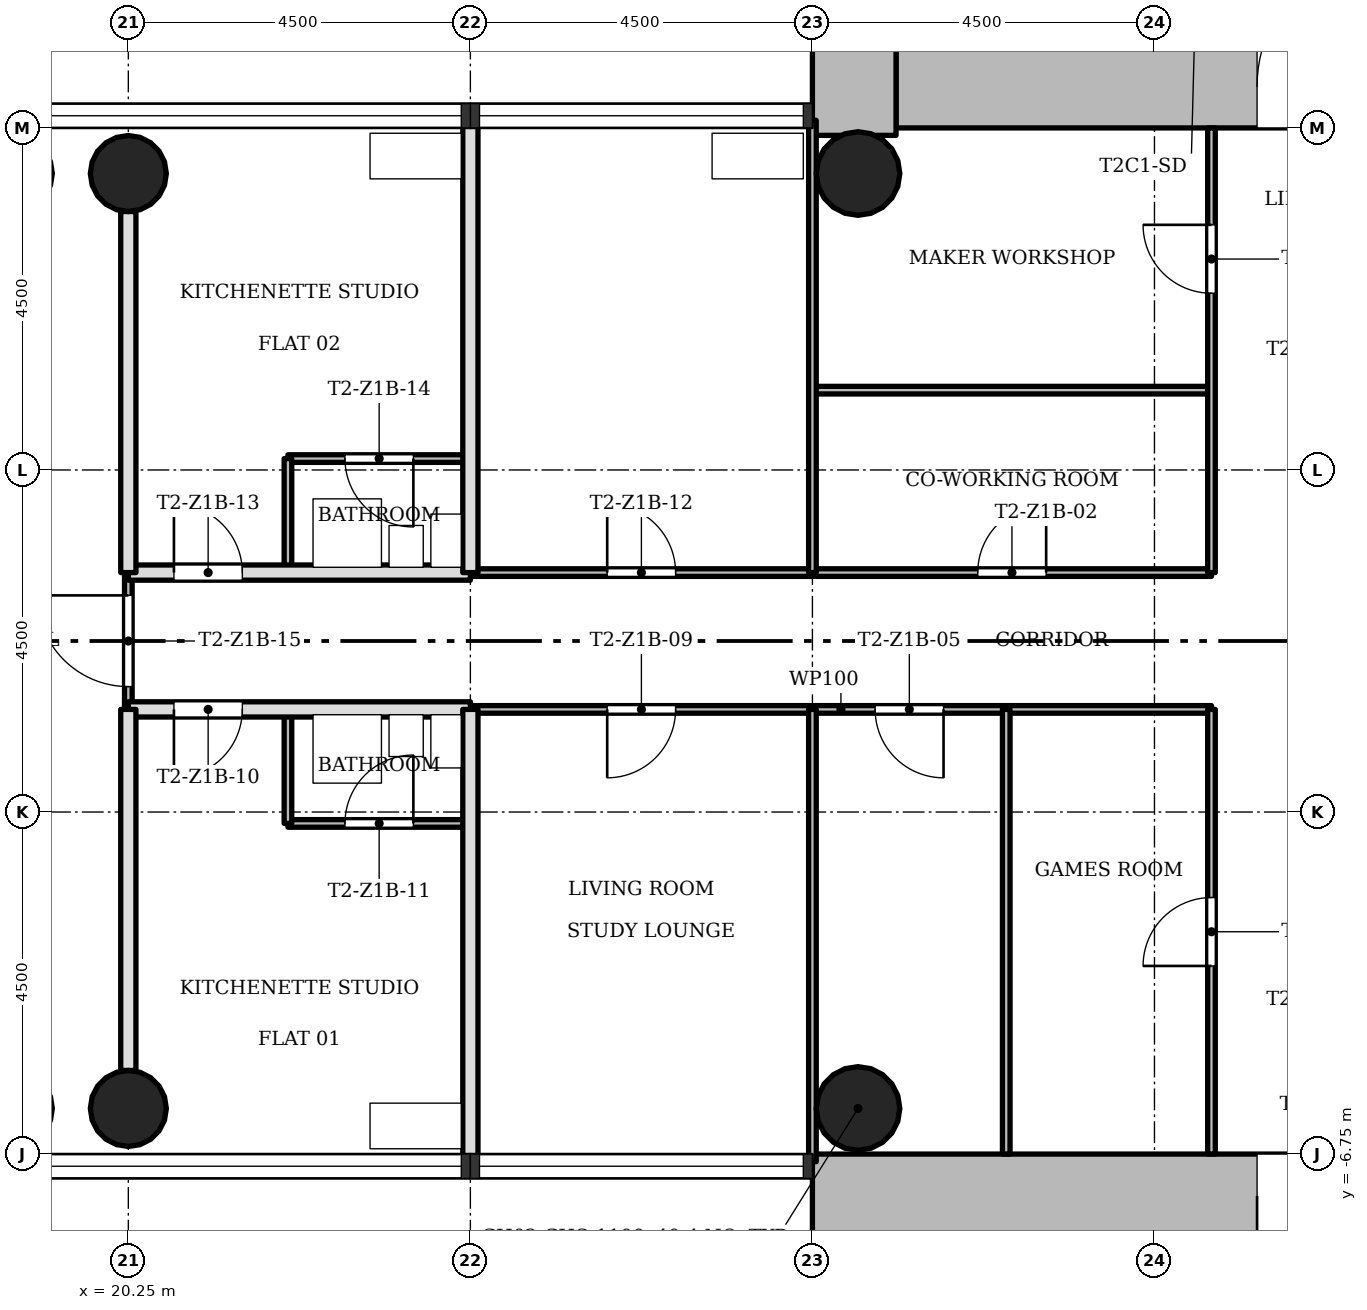
"""IFC4 building model, lengths in metres.
Left out: names, types, materials, properties, quantities, classifications, styles, units other than length and angle.
Written with IfcOpenShell. Run it as: python <this file> out.ifc"""

import sys

from ifc_helpers import new_model, si_unit, direction, frame, frame_2d, origin, origin_2d, place, context, subcontext, project, spatial, rectangle, hollow_circle, extrude, element, fill, save


model = new_model("IFC4")
c1 = context("Model", 3, precision=1e-05, world=origin(), true_north=direction((0.0, 1.0)))
c2 = subcontext(c1, "Body", "Model", "MODEL_VIEW")
j1 = project(units=[si_unit("LENGTHUNIT", "METRE"), si_unit("PLANEANGLEUNIT", "RADIAN")], contexts=[c1])
p1 = place(None, origin())
s1 = spatial("IfcSite", under=j1, at=p1, CompositionType="ELEMENT")
p2 = place(p1, origin())
s2 = spatial("IfcBuilding", under=s1, at=p2, CompositionType="ELEMENT")
p3 = place(p2, frame((0.0, 0.0, 41.5)))
s3 = spatial("IfcBuildingStorey", under=s2, at=p3, CompositionType="ELEMENT", Elevation=41.5)
p4 = place(p3, frame((30.35, 7.3, 0.0), z_axis=(0.0, 0.0, 1.0), x_axis=(1.0, 0.0, 0.0)))
e1 = element("IfcWall", 1, at=p4, inside=s3, PredefinedType="SHEAR", context=c2, shape_type="SweptSolid", body=[
    extrude(rectangle(XDim=12.4, YDim=1.1, at=frame_2d((6.2, 0.0))), origin(), (0.0, 0.0, 1.0), 3.4),
])
p5 = place(p4, frame((4.75, 0.0, 0.0)))
e2 = element("IfcOpeningElement", 2, at=p5, cuts=e1, PredefinedType="OPENING", context=c2, shape_type="SweptSolid", body=[
    extrude(rectangle(XDim=1.8, YDim=2.1, at=frame_2d((0.9, 1.05))), frame((0.0, 0.56, 0.0), z_axis=(0.0, -1.0, 0.0), x_axis=(1.0, 0.0, 0.0)), (0.0, 0.0, 1.0), 1.12),
])
p6 = place(p3, frame((29.8, 15.248, 0.0), z_axis=(0.0, 0.0, 1.0), x_axis=(0.0, -1.0, 0.0)))
e3 = element("IfcWall", 3, at=p6, inside=s3, PredefinedType="SHEAR", context=c2, shape_type="SweptSolid", body=[
    extrude(rectangle(XDim=8.596, YDim=1.1, at=frame_2d((4.298, 0.0))), origin(), (0.0, 0.0, 1.0), 3.4),
])
p7 = place(p3, frame((41.65, -7.3, 0.0), z_axis=(0.0, 0.0, 1.0), x_axis=(-1.0, 0.0, 0.0)))
e4 = element("IfcWall", 4, at=p7, inside=s3, PredefinedType="SHEAR", context=c2, shape_type="SweptSolid", body=[
    extrude(rectangle(XDim=12.4, YDim=1.1, at=frame_2d((6.2, 0.0))), origin(), (0.0, 0.0, 1.0), 3.4),
])
p8 = place(p7, frame((4.75, 0.0, 0.0)))
e5 = element("IfcOpeningElement", 5, at=p8, cuts=e4, PredefinedType="OPENING", context=c2, shape_type="SweptSolid", body=[
    extrude(rectangle(XDim=1.8, YDim=2.1, at=frame_2d((0.9, 1.05))), frame((0.0, 0.56, 0.0), z_axis=(0.0, -1.0, 0.0), x_axis=(1.0, 0.0, 0.0)), (0.0, 0.0, 1.0), 1.12),
])
for number, where, z_axis, x_axis in (
    (6, (20.25, 6.15, 0.0), (0.0, 0.0, 1.0), (1.0, 0.0, 0.0)),
    (7, (20.25, -6.15, 0.0), (0.0, 0.0, 1.0), (1.0, 0.0, 0.0)),
):
    element("IfcColumn", number, at=place(p3, frame(where, z_axis=z_axis, x_axis=x_axis)), inside=s3, PredefinedType="COLUMN", context=c2, shape_type="SweptSolid", body=[
        extrude(hollow_circle(Radius=0.5, WallThickness=0.036, at=origin_2d()), origin(), (0.0, 0.0, 1.0), 3.4),
    ])
for number, where, z_axis, x_axis in (
    (8, (29.85, 6.15, 0.0), (0.0, 0.0, 1.0), (1.0, 0.0, 0.0)),
    (9, (29.85, -6.15, 0.0), (0.0, 0.0, 1.0), (1.0, 0.0, 0.0)),
):
    element("IfcColumn", number, at=place(p3, frame(where, z_axis=z_axis, x_axis=x_axis)), inside=s3, PredefinedType="COLUMN", context=c2, shape_type="SweptSolid", body=[
        extrude(hollow_circle(Radius=0.55, WallThickness=0.04, at=origin_2d()), origin(), (0.0, 0.0, 1.0), 3.4),
    ])
p9 = place(p3, frame((24.75, -2.4, 0.0), z_axis=(0.0, 0.0, 1.0), x_axis=(-1.0, 0.0, 0.0)))
e10 = element("IfcWall", 10, at=p9, inside=s3, PredefinedType="PARTITIONING", context=c2, shape_type="SweptSolid", body=[
    extrude(rectangle(XDim=2.4, YDim=0.1, at=frame_2d((1.2, 0.0))), origin(), (0.0, 0.0, 1.0), 3.0),
])
p10 = place(p9, frame((0.75, 0.0, 0.0)))
e11 = element("IfcOpeningElement", 11, at=p10, cuts=e10, PredefinedType="OPENING", context=c2, shape_type="SweptSolid", body=[
    extrude(rectangle(XDim=0.9, YDim=2.1, at=frame_2d((0.45, 1.05))), frame((0.0, 0.06, 0.0), z_axis=(0.0, -1.0, 0.0), x_axis=(1.0, 0.0, 0.0)), (0.0, 0.0, 1.0), 0.12),
])
p11 = place(p3, frame((34.5, -0.9, 0.0), z_axis=(0.0, 0.0, 1.0), x_axis=(-1.0, 0.0, 0.0)))
e12 = element("IfcWall", 12, at=p11, inside=s3, PredefinedType="PARTITIONING", context=c2, shape_type="SweptSolid", body=[
    extrude(rectangle(XDim=9.75, YDim=0.1, at=frame_2d((4.875, 0.0))), origin(), (0.0, 0.0, 1.0), 3.0),
])
p12 = place(p11, frame((3.525, 0.0, 0.0)))
e13 = element("IfcOpeningElement", 13, at=p12, cuts=e12, PredefinedType="OPENING", context=c2, shape_type="SweptSolid", body=[
    extrude(rectangle(XDim=0.9, YDim=2.1, at=frame_2d((0.45, 1.05))), frame((0.0, 0.06, 0.0), z_axis=(0.0, -1.0, 0.0), x_axis=(1.0, 0.0, 0.0)), (0.0, 0.0, 1.0), 0.12),
])
p13 = place(p11, frame((7.05, 0.0, 0.0)))
e14 = element("IfcOpeningElement", 14, at=p13, cuts=e12, PredefinedType="OPENING", context=c2, shape_type="SweptSolid", body=[
    extrude(rectangle(XDim=0.9, YDim=2.1, at=frame_2d((0.45, 1.05))), frame((0.0, 0.06, 0.0), z_axis=(0.0, -1.0, 0.0), x_axis=(1.0, 0.0, 0.0)), (0.0, 0.0, 1.0), 0.12),
])
p14 = place(p3, frame((24.75, -0.9, 0.0), z_axis=(0.0, 0.0, 1.0), x_axis=(-1.0, 0.0, 0.0)))
e15 = element("IfcWall", 15, at=p14, inside=s3, PredefinedType="SOLIDWALL", context=c2, shape_type="SweptSolid", body=[
    extrude(rectangle(XDim=4.5, YDim=0.2, at=frame_2d((2.25, 0.0))), origin(), (0.0, 0.0, 1.0), 3.0),
])
p15 = place(p14, frame((3.0, 0.0, 0.0)))
e16 = element("IfcOpeningElement", 16, at=p15, cuts=e15, PredefinedType="OPENING", context=c2, shape_type="SweptSolid", body=[
    extrude(rectangle(XDim=0.9, YDim=2.1, at=frame_2d((0.45, 1.05))), frame((0.0, 0.11, 0.0), z_axis=(0.0, -1.0, 0.0), x_axis=(1.0, 0.0, 0.0)), (0.0, 0.0, 1.0), 0.22),
])
p16 = place(p3, frame((34.5, 0.9, 0.0), z_axis=(0.0, 0.0, 1.0), x_axis=(-1.0, 0.0, 0.0)))
e17 = element("IfcWall", 17, at=p16, inside=s3, PredefinedType="PARTITIONING", context=c2, shape_type="SweptSolid", body=[
    extrude(rectangle(XDim=9.75, YDim=0.1, at=frame_2d((4.875, 0.0))), origin(), (0.0, 0.0, 1.0), 3.0),
])
p17 = place(p16, frame((2.175, 0.0, 0.0)))
e18 = element("IfcOpeningElement", 18, at=p17, cuts=e17, PredefinedType="OPENING", context=c2, shape_type="SweptSolid", body=[
    extrude(rectangle(XDim=0.9, YDim=2.1, at=frame_2d((0.45, 1.05))), frame((0.0, 0.06, 0.0), z_axis=(0.0, -1.0, 0.0), x_axis=(1.0, 0.0, 0.0)), (0.0, 0.0, 1.0), 0.12),
])
p18 = place(p16, frame((7.05, 0.0, 0.0)))
e19 = element("IfcOpeningElement", 19, at=p18, cuts=e17, PredefinedType="OPENING", context=c2, shape_type="SweptSolid", body=[
    extrude(rectangle(XDim=0.9, YDim=2.1, at=frame_2d((0.45, 1.05))), frame((0.0, 0.06, 0.0), z_axis=(0.0, -1.0, 0.0), x_axis=(1.0, 0.0, 0.0)), (0.0, 0.0, 1.0), 0.12),
])
p19 = place(p3, frame((24.75, 0.9, 0.0), z_axis=(0.0, 0.0, 1.0), x_axis=(-1.0, 0.0, 0.0)))
e20 = element("IfcWall", 20, at=p19, inside=s3, PredefinedType="SOLIDWALL", context=c2, shape_type="SweptSolid", body=[
    extrude(rectangle(XDim=4.5, YDim=0.2, at=frame_2d((2.25, 0.0))), origin(), (0.0, 0.0, 1.0), 3.0),
])
p20 = place(p19, frame((3.0, 0.0, 0.0)))
e21 = element("IfcOpeningElement", 21, at=p20, cuts=e20, PredefinedType="OPENING", context=c2, shape_type="SweptSolid", body=[
    extrude(rectangle(XDim=0.9, YDim=2.1, at=frame_2d((0.45, 1.05))), frame((0.0, 0.11, 0.0), z_axis=(0.0, -1.0, 0.0), x_axis=(1.0, 0.0, 0.0)), (0.0, 0.0, 1.0), 0.22),
])
p21 = place(p3, frame((24.75, 2.4, 0.0), z_axis=(0.0, 0.0, 1.0), x_axis=(-1.0, 0.0, 0.0)))
e22 = element("IfcWall", 22, at=p21, inside=s3, PredefinedType="PARTITIONING", context=c2, shape_type="SweptSolid", body=[
    extrude(rectangle(XDim=2.4, YDim=0.1, at=frame_2d((1.2, 0.0))), origin(), (0.0, 0.0, 1.0), 3.0),
])
p22 = place(p21, frame((0.75, 0.0, 0.0)))
e23 = element("IfcOpeningElement", 23, at=p22, cuts=e22, PredefinedType="OPENING", context=c2, shape_type="SweptSolid", body=[
    extrude(rectangle(XDim=0.9, YDim=2.1, at=frame_2d((0.45, 1.05))), frame((0.0, 0.06, 0.0), z_axis=(0.0, -1.0, 0.0), x_axis=(1.0, 0.0, 0.0)), (0.0, 0.0, 1.0), 0.12),
])
p23 = place(p3, frame((34.5, 3.3, 0.0), z_axis=(0.0, 0.0, 1.0), x_axis=(-1.0, 0.0, 0.0)))
e24 = element("IfcWall", 24, at=p23, inside=s3, PredefinedType="PARTITIONING", context=c2, shape_type="SweptSolid", body=[
    extrude(rectangle(XDim=5.25, YDim=0.1, at=frame_2d((2.625, 0.0))), origin(), (0.0, 0.0, 1.0), 3.0),
])
p24 = place(p3, frame((34.5, -6.75, 0.0), z_axis=(0.0, 0.0, 1.0), x_axis=(0.0, 1.0, 0.0)))
e25 = element("IfcWall", 25, at=p24, inside=s3, PredefinedType="PARTITIONING", context=c2, shape_type="SweptSolid", body=[
    extrude(rectangle(XDim=5.85, YDim=0.1, at=frame_2d((2.925, 0.0))), origin(), (0.0, 0.0, 1.0), 3.0),
])
p25 = place(p24, frame((2.475, 0.0, 0.0)))
e26 = element("IfcOpeningElement", 26, at=p25, cuts=e25, PredefinedType="OPENING", context=c2, shape_type="SweptSolid", body=[
    extrude(rectangle(XDim=0.9, YDim=2.1, at=frame_2d((0.45, 1.05))), frame((0.0, 0.06, 0.0), z_axis=(0.0, -1.0, 0.0), x_axis=(1.0, 0.0, 0.0)), (0.0, 0.0, 1.0), 0.12),
])
p26 = place(p3, frame((34.5, 0.9, 0.0), z_axis=(0.0, 0.0, 1.0), x_axis=(0.0, 1.0, 0.0)))
e27 = element("IfcWall", 27, at=p26, inside=s3, PredefinedType="PARTITIONING", context=c2, shape_type="SweptSolid", body=[
    extrude(rectangle(XDim=5.85, YDim=0.1, at=frame_2d((2.925, 0.0))), origin(), (0.0, 0.0, 1.0), 3.0),
])
p27 = place(p26, frame((3.675, 0.0, 0.0)))
e28 = element("IfcOpeningElement", 28, at=p27, cuts=e27, PredefinedType="OPENING", context=c2, shape_type="SweptSolid", body=[
    extrude(rectangle(XDim=0.9, YDim=2.1, at=frame_2d((0.45, 1.05))), frame((0.0, 0.06, 0.0), z_axis=(0.0, -1.0, 0.0), x_axis=(1.0, 0.0, 0.0)), (0.0, 0.0, 1.0), 0.12),
])
p28 = place(p3, frame((31.8, -6.75, 0.0), z_axis=(0.0, 0.0, 1.0), x_axis=(0.0, 1.0, 0.0)))
e29 = element("IfcWall", 29, at=p28, inside=s3, PredefinedType="PARTITIONING", context=c2, shape_type="SweptSolid", body=[
    extrude(rectangle(XDim=5.85, YDim=0.1, at=frame_2d((2.925, 0.0))), origin(), (0.0, 0.0, 1.0), 3.0),
])
for number, where, z_axis, x_axis in (
    (30, (29.25, -6.85, 0.0), (0.0, 0.0, 1.0), (0.0, 1.0, 0.0)),
    (31, (29.25, 0.9, 0.0), (0.0, 0.0, 1.0), (0.0, 1.0, 0.0)),
):
    element("IfcWall", number, at=place(p3, frame(where, z_axis=z_axis, x_axis=x_axis)), inside=s3, PredefinedType="PARTITIONING", context=c2, shape_type="SweptSolid", body=[
        extrude(rectangle(XDim=5.95, YDim=0.1, at=frame_2d((2.975, 0.0))), origin(), (0.0, 0.0, 1.0), 3.0),
    ])
for number, where, z_axis, x_axis in (
    (32, (24.75, -6.85, 0.0), (0.0, 0.0, 1.0), (0.0, 1.0, 0.0)),
    (33, (24.75, 0.9, 0.0), (0.0, 0.0, 1.0), (0.0, 1.0, 0.0)),
):
    element("IfcWall", number, at=place(p3, frame(where, z_axis=z_axis, x_axis=x_axis)), inside=s3, PredefinedType="SOLIDWALL", context=c2, shape_type="SweptSolid", body=[
        extrude(rectangle(XDim=5.95, YDim=0.2, at=frame_2d((2.975, 0.0))), origin(), (0.0, 0.0, 1.0), 3.0),
    ])
for number, where, z_axis, x_axis in (
    (34, (22.35, -2.4, 0.0), (0.0, 0.0, 1.0), (0.0, 1.0, 0.0)),
    (35, (22.35, 0.9, 0.0), (0.0, 0.0, 1.0), (0.0, 1.0, 0.0)),
):
    element("IfcWall", number, at=place(p3, frame(where, z_axis=z_axis, x_axis=x_axis)), inside=s3, PredefinedType="PARTITIONING", context=c2, shape_type="SweptSolid", body=[
        extrude(rectangle(XDim=1.5, YDim=0.1, at=frame_2d((0.75, 0.0))), origin(), (0.0, 0.0, 1.0), 3.0),
    ])
p29 = place(p3, frame((20.25, -0.9, 0.0), z_axis=(0.0, 0.0, 1.0), x_axis=(0.0, 1.0, 0.0)))
e36 = element("IfcWall", 36, at=p29, inside=s3, PredefinedType="PARTITIONING", context=c2, shape_type="SweptSolid", body=[
    extrude(rectangle(XDim=1.8, YDim=0.1, at=frame_2d((0.9, 0.0))), origin(), (0.0, 0.0, 1.0), 3.0),
])
p30 = place(p29, frame((0.3, 0.0, 0.0)))
e37 = element("IfcOpeningElement", 37, at=p30, cuts=e36, PredefinedType="OPENING", context=c2, shape_type="SweptSolid", body=[
    extrude(rectangle(XDim=1.2, YDim=2.1, at=frame_2d((0.6, 1.05))), frame((0.0, 0.06, 0.0), z_axis=(0.0, -1.0, 0.0), x_axis=(1.0, 0.0, 0.0)), (0.0, 0.0, 1.0), 0.12),
])
for number, where, z_axis, x_axis in (
    (38, (20.25, -5.65, 0.0), (0.0, 0.0, 1.0), (0.0, 1.0, 0.0)),
    (39, (20.25, 0.9, 0.0), (0.0, 0.0, 1.0), (0.0, 1.0, 0.0)),
):
    element("IfcWall", number, at=place(p3, frame(where, z_axis=z_axis, x_axis=x_axis)), inside=s3, PredefinedType="SOLIDWALL", context=c2, shape_type="SweptSolid", body=[
        extrude(rectangle(XDim=4.75, YDim=0.2, at=frame_2d((2.375, 0.0))), origin(), (0.0, 0.0, 1.0), 3.0),
    ])
p31 = place(p17, origin())
e40 = element("IfcDoor", 40, at=p31, inside=s3, OperationType="SINGLE_SWING_LEFT", PredefinedType="DOOR", context=c2, shape_type="SweptSolid", body=[
    extrude(rectangle(XDim=0.9, YDim=2.1, at=frame_2d((0.45, 1.05))), frame((0.0, 0.025, 0.0), z_axis=(0.0, -1.0, 0.0), x_axis=(1.0, 0.0, 0.0)), (0.0, 0.0, 1.0), 0.05),
])
fill(e18, e40)
p32 = place(p27, origin())
e41 = element("IfcDoor", 41, at=p32, inside=s3, OperationType="SINGLE_SWING_LEFT", PredefinedType="DOOR", context=c2, shape_type="SweptSolid", body=[
    extrude(rectangle(XDim=0.9, YDim=2.1, at=frame_2d((0.45, 1.05))), frame((0.0, 0.025, 0.0), z_axis=(0.0, -1.0, 0.0), x_axis=(1.0, 0.0, 0.0)), (0.0, 0.0, 1.0), 0.05),
])
fill(e28, e41)
p33 = place(p25, origin())
e42 = element("IfcDoor", 42, at=p33, inside=s3, OperationType="SINGLE_SWING_RIGHT", PredefinedType="DOOR", context=c2, shape_type="SweptSolid", body=[
    extrude(rectangle(XDim=0.9, YDim=2.1, at=frame_2d((0.45, 1.05))), frame((0.0, 0.025, 0.0), z_axis=(0.0, -1.0, 0.0), x_axis=(1.0, 0.0, 0.0)), (0.0, 0.0, 1.0), 0.05),
])
fill(e26, e42)
p34 = place(p12, origin())
e43 = element("IfcDoor", 43, at=p34, inside=s3, OperationType="SINGLE_SWING_RIGHT", PredefinedType="DOOR", context=c2, shape_type="SweptSolid", body=[
    extrude(rectangle(XDim=0.9, YDim=2.1, at=frame_2d((0.45, 1.05))), frame((0.0, 0.025, 0.0), z_axis=(0.0, -1.0, 0.0), x_axis=(1.0, 0.0, 0.0)), (0.0, 0.0, 1.0), 0.05),
])
fill(e13, e43)
p35 = place(p13, origin())
e44 = element("IfcDoor", 44, at=p35, inside=s3, OperationType="SINGLE_SWING_LEFT", PredefinedType="DOOR", context=c2, shape_type="SweptSolid", body=[
    extrude(rectangle(XDim=0.9, YDim=2.1, at=frame_2d((0.45, 1.05))), frame((0.0, 0.025, 0.0), z_axis=(0.0, -1.0, 0.0), x_axis=(1.0, 0.0, 0.0)), (0.0, 0.0, 1.0), 0.05),
])
fill(e14, e44)
p36 = place(p15, origin())
e45 = element("IfcDoor", 45, at=p36, inside=s3, OperationType="SINGLE_SWING_LEFT", PredefinedType="DOOR", context=c2, shape_type="SweptSolid", body=[
    extrude(rectangle(XDim=0.9, YDim=2.1, at=frame_2d((0.45, 1.05))), frame((0.0, 0.025, 0.0), z_axis=(0.0, -1.0, 0.0), x_axis=(1.0, 0.0, 0.0)), (0.0, 0.0, 1.0), 0.05),
])
fill(e16, e45)
p37 = place(p10, origin())
e46 = element("IfcDoor", 46, at=p37, inside=s3, OperationType="SINGLE_SWING_LEFT", PredefinedType="DOOR", context=c2, shape_type="SweptSolid", body=[
    extrude(rectangle(XDim=0.9, YDim=2.1, at=frame_2d((0.45, 1.05))), frame((0.0, 0.025, 0.0), z_axis=(0.0, -1.0, 0.0), x_axis=(1.0, 0.0, 0.0)), (0.0, 0.0, 1.0), 0.05),
])
fill(e11, e46)
p38 = place(p18, origin())
e47 = element("IfcDoor", 47, at=p38, inside=s3, OperationType="SINGLE_SWING_RIGHT", PredefinedType="DOOR", context=c2, shape_type="SweptSolid", body=[
    extrude(rectangle(XDim=0.9, YDim=2.1, at=frame_2d((0.45, 1.05))), frame((0.0, 0.025, 0.0), z_axis=(0.0, -1.0, 0.0), x_axis=(1.0, 0.0, 0.0)), (0.0, 0.0, 1.0), 0.05),
])
fill(e19, e47)
p39 = place(p20, origin())
e48 = element("IfcDoor", 48, at=p39, inside=s3, OperationType="SINGLE_SWING_RIGHT", PredefinedType="DOOR", context=c2, shape_type="SweptSolid", body=[
    extrude(rectangle(XDim=0.9, YDim=2.1, at=frame_2d((0.45, 1.05))), frame((0.0, 0.025, 0.0), z_axis=(0.0, -1.0, 0.0), x_axis=(1.0, 0.0, 0.0)), (0.0, 0.0, 1.0), 0.05),
])
fill(e21, e48)
p40 = place(p22, origin())
e49 = element("IfcDoor", 49, at=p40, inside=s3, OperationType="SINGLE_SWING_RIGHT", PredefinedType="DOOR", context=c2, shape_type="SweptSolid", body=[
    extrude(rectangle(XDim=0.9, YDim=2.1, at=frame_2d((0.45, 1.05))), frame((0.0, 0.025, 0.0), z_axis=(0.0, -1.0, 0.0), x_axis=(1.0, 0.0, 0.0)), (0.0, 0.0, 1.0), 0.05),
])
fill(e23, e49)
p41 = place(p30, origin())
e50 = element("IfcDoor", 50, at=p41, inside=s3, OperationType="SINGLE_SWING_LEFT", PredefinedType="DOOR", context=c2, shape_type="SweptSolid", body=[
    extrude(rectangle(XDim=1.2, YDim=2.1, at=frame_2d((0.6, 1.05))), frame((0.0, 0.025, 0.0), z_axis=(0.0, -1.0, 0.0), x_axis=(1.0, 0.0, 0.0)), (0.0, 0.0, 1.0), 0.05),
])
fill(e37, e50)
p42 = place(p5, origin())
e51 = element("IfcDoor", 51, at=p42, inside=s3, OperationType="SINGLE_SWING_LEFT", PredefinedType="DOOR", context=c2, shape_type="SweptSolid", body=[
    extrude(rectangle(XDim=1.8, YDim=2.1, at=frame_2d((0.9, 1.05))), frame((0.0, 0.025, 0.0), z_axis=(0.0, -1.0, 0.0), x_axis=(1.0, 0.0, 0.0)), (0.0, 0.0, 1.0), 0.05),
])
fill(e2, e51)
p43 = place(p8, origin())
e52 = element("IfcDoor", 52, at=p43, inside=s3, OperationType="SINGLE_SWING_LEFT", PredefinedType="DOOR", context=c2, shape_type="SweptSolid", body=[
    extrude(rectangle(XDim=1.8, YDim=2.1, at=frame_2d((0.9, 1.05))), frame((0.0, 0.025, 0.0), z_axis=(0.0, -1.0, 0.0), x_axis=(1.0, 0.0, 0.0)), (0.0, 0.0, 1.0), 0.05),
])
fill(e5, e52)
save(model, sys.argv[1])
